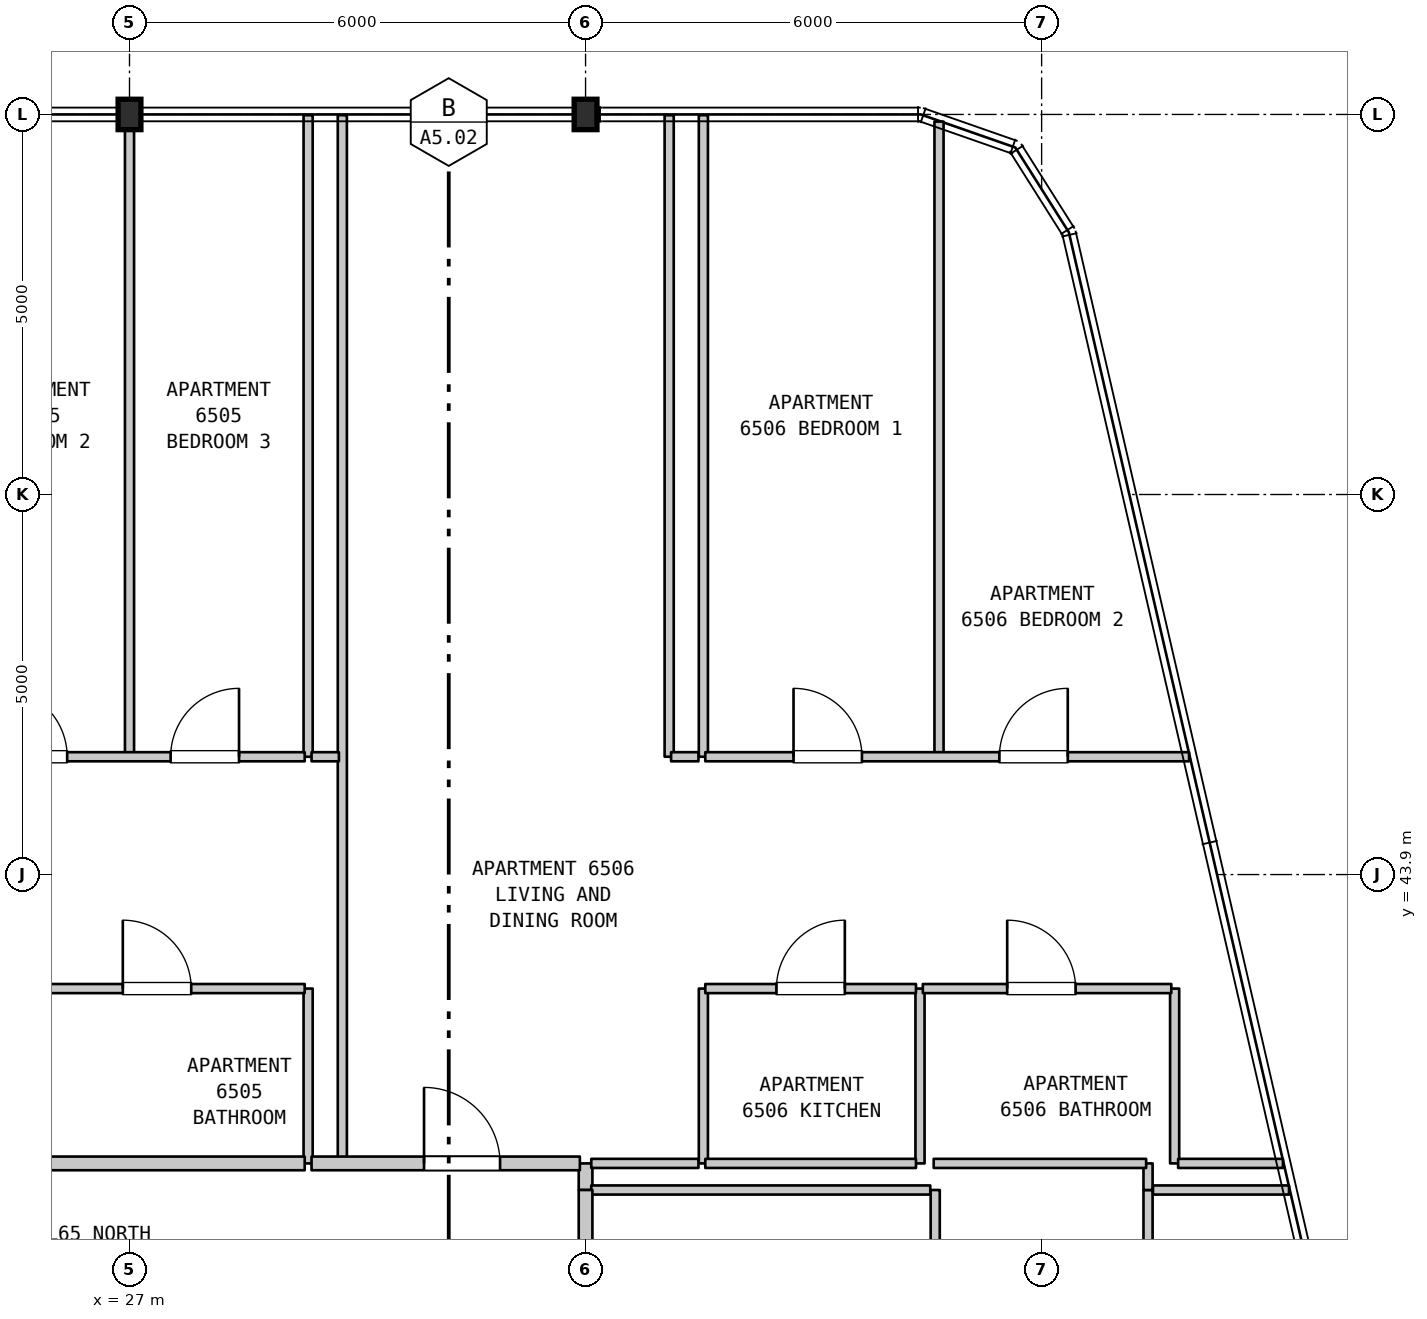
"""IFC4 building model, lengths in metres.
Left out: names, types, materials, properties, quantities, classifications, styles, units other than length and angle.
Written with IfcOpenShell. Run it as: python <this file> out.ifc"""

import sys

from ifc_helpers import new_model, si_unit, direction, frame, frame_2d, origin, origin_2d, place, context, subcontext, project, spatial, rectangle, i_section, extrude, element, fill, save


model = new_model("IFC4")
c1 = context("Model", 3, precision=1e-05, world=origin(), true_north=direction((0.0, 1.0)))
c2 = subcontext(c1, "Body", "Model", "MODEL_VIEW")
j1 = project(units=[si_unit("LENGTHUNIT", "METRE"), si_unit("PLANEANGLEUNIT", "RADIAN")], contexts=[c1])
p1 = place(None, origin())
s1 = spatial("IfcSite", under=j1, at=p1, CompositionType="ELEMENT")
p2 = place(p1, origin())
s2 = spatial("IfcBuilding", under=s1, at=p2, CompositionType="ELEMENT")
p3 = place(p2, frame((0.0, 0.0, 262.1)))
s3 = spatial("IfcBuildingStorey", under=s2, at=p3, CompositionType="ELEMENT", Elevation=262.1)
for number, where, z_axis, x_axis in (
    (1, (27.0, 53.9, 0.0), (0.0, 0.0, 1.0), (1.0, 0.0, 0.0)),
    (2, (33.0, 53.9, 0.0), (0.0, 0.0, 1.0), (1.0, 0.0, 0.0)),
):
    element("IfcColumn", number, at=place(p3, frame(where, z_axis=z_axis, x_axis=x_axis)), inside=s3, PredefinedType="COLUMN", context=c2, shape_type="SweptSolid", body=[
        extrude(i_section(OverallWidth=0.3, OverallDepth=0.4, WebThickness=0.013, FlangeThickness=0.024, FilletRadius=0.027, at=origin_2d()), origin(), (0.0, 0.0, 1.0), 3.7),
    ])
p4 = place(p3, frame((27.0, 45.45, 0.0), z_axis=(0.0, 0.0, 1.0), x_axis=(0.0, 1.0, 0.0)))
e3 = element("IfcWall", 3, at=p4, inside=s3, PredefinedType="PARTITIONING", context=c2, shape_type="SweptSolid", body=[
    extrude(rectangle(XDim=8.44, YDim=0.12, at=frame_2d((4.22, 0.0))), origin(), (0.0, 0.0, 1.0), 3.15),
])
p5 = place(p3, frame((29.35, 40.1, 0.0), z_axis=(0.0, 0.0, 1.0), x_axis=(0.0, 1.0, 0.0)))
e4 = element("IfcWall", 4, at=p5, inside=s3, PredefinedType="PARTITIONING", context=c2, shape_type="SweptSolid", body=[
    extrude(rectangle(XDim=2.3, YDim=0.12, at=frame_2d((1.15, 0.0))), origin(), (0.0, 0.0, 1.0), 3.39),
])
p6 = place(p3, frame((29.35, 45.45, 0.0), z_axis=(0.0, 0.0, 1.0), x_axis=(0.0, 1.0, 0.0)))
e5 = element("IfcWall", 5, at=p6, inside=s3, PredefinedType="PARTITIONING", context=c2, shape_type="SweptSolid", body=[
    extrude(rectangle(XDim=8.44, YDim=0.12, at=frame_2d((4.22, 0.0))), origin(), (0.0, 0.0, 1.0), 3.39),
])
p7 = place(p3, frame((29.8, 40.1, 0.0), z_axis=(0.0, 0.0, 1.0), x_axis=(0.0, 1.0, 0.0)))
e6 = element("IfcWall", 6, at=p7, inside=s3, PredefinedType="PARTITIONING", context=c2, shape_type="SweptSolid", body=[
    extrude(rectangle(XDim=13.79, YDim=0.12, at=frame_2d((6.895, 0.0))), origin(), (0.0, 0.0, 1.0), 3.39),
])
p8 = place(p3, frame((33.0, 39.75, 0.0), z_axis=(0.0, 0.0, 1.0), x_axis=(0.0, 1.0, 0.0)))
e7 = element("IfcWall", 7, at=p8, inside=s3, PredefinedType="STANDARD", context=c2, shape_type="SweptSolid", body=[
    extrude(rectangle(XDim=0.35, YDim=0.18, at=frame_2d((0.175, 0.0))), origin(), (0.0, 0.0, 1.0), 3.39),
])
p9 = place(p3, frame((34.1, 45.45, 0.0), z_axis=(0.0, 0.0, 1.0), x_axis=(0.0, 1.0, 0.0)))
e8 = element("IfcWall", 8, at=p9, inside=s3, PredefinedType="PARTITIONING", context=c2, shape_type="SweptSolid", body=[
    extrude(rectangle(XDim=8.44, YDim=0.12, at=frame_2d((4.22, 0.0))), origin(), (0.0, 0.0, 1.0), 3.39),
])
p10 = place(p3, frame((34.55, 40.1, 0.0), z_axis=(0.0, 0.0, 1.0), x_axis=(0.0, 1.0, 0.0)))
e9 = element("IfcWall", 9, at=p10, inside=s3, PredefinedType="PARTITIONING", context=c2, shape_type="SweptSolid", body=[
    extrude(rectangle(XDim=2.3, YDim=0.12, at=frame_2d((1.15, 0.0))), origin(), (0.0, 0.0, 1.0), 3.39),
])
p11 = place(p3, frame((34.55, 45.45, 0.0), z_axis=(0.0, 0.0, 1.0), x_axis=(0.0, 1.0, 0.0)))
e10 = element("IfcWall", 10, at=p11, inside=s3, PredefinedType="PARTITIONING", context=c2, shape_type="SweptSolid", body=[
    extrude(rectangle(XDim=8.44, YDim=0.12, at=frame_2d((4.22, 0.0))), origin(), (0.0, 0.0, 1.0), 3.39),
])
p12 = place(p3, frame((37.4, 40.1, 0.0), z_axis=(0.0, 0.0, 1.0), x_axis=(0.0, 1.0, 0.0)))
e11 = element("IfcWall", 11, at=p12, inside=s3, PredefinedType="PARTITIONING", context=c2, shape_type="SweptSolid", body=[
    extrude(rectangle(XDim=2.3, YDim=0.12, at=frame_2d((1.15, 0.0))), origin(), (0.0, 0.0, 1.0), 3.39),
])
p13 = place(p3, frame((37.6, 36.095, 0.0), z_axis=(0.0, 0.0, 1.0), x_axis=(0.0, 1.0, 0.0)))
e12 = element("IfcWall", 12, at=p13, inside=s3, PredefinedType="PARTITIONING", context=c2, shape_type="SweptSolid", body=[
    extrude(rectangle(XDim=3.655, YDim=0.12, at=frame_2d((1.828, 0.0))), origin(), (0.0, 0.0, 1.0), 3.39),
])
p14 = place(p13, frame((1.377, 0.0, 0.0)))
e13 = element("IfcOpeningElement", 13, at=p14, cuts=e12, PredefinedType="OPENING", context=c2, shape_type="SweptSolid", body=[
    extrude(rectangle(XDim=0.9, YDim=2.15, at=frame_2d((0.45, 1.075))), frame((0.0, 0.07, 0.0), z_axis=(0.0, -1.0, 0.0), x_axis=(1.0, 0.0, 0.0)), (0.0, 0.0, 1.0), 0.14),
])
p15 = place(p3, frame((37.65, 45.45, 0.0), z_axis=(0.0, 0.0, 1.0), x_axis=(0.0, 1.0, 0.0)))
e14 = element("IfcWall", 14, at=p15, inside=s3, PredefinedType="PARTITIONING", context=c2, shape_type="SweptSolid", body=[
    extrude(rectangle(XDim=8.356, YDim=0.12, at=frame_2d((4.178, 0.0))), origin(), (0.0, 0.0, 1.0), 3.39),
])
p16 = place(p3, frame((40.4, 29.0, 0.0), z_axis=(0.0, 0.0, 1.0), x_axis=(0.0, 1.0, 0.0)))
e15 = element("IfcWall", 15, at=p16, inside=s3, PredefinedType="PARTITIONING", context=c2, shape_type="SweptSolid", body=[
    extrude(rectangle(XDim=10.75, YDim=0.12, at=frame_2d((5.375, 0.0))), origin(), (0.0, 0.0, 1.0), 3.39),
])
p17 = place(p16, frame((2.413, 0.0, 0.0)))
e16 = element("IfcOpeningElement", 16, at=p17, cuts=e15, PredefinedType="OPENING", context=c2, shape_type="SweptSolid", body=[
    extrude(rectangle(XDim=0.9, YDim=2.15, at=frame_2d((0.45, 1.075))), frame((0.0, 0.07, 0.0), z_axis=(0.0, -1.0, 0.0), x_axis=(1.0, 0.0, 0.0)), (0.0, 0.0, 1.0), 0.14),
])
p18 = place(p16, frame((7.438, 0.0, 0.0)))
e17 = element("IfcOpeningElement", 17, at=p18, cuts=e15, PredefinedType="OPENING", context=c2, shape_type="SweptSolid", body=[
    extrude(rectangle(XDim=0.9, YDim=2.15, at=frame_2d((0.45, 1.075))), frame((0.0, 0.07, 0.0), z_axis=(0.0, -1.0, 0.0), x_axis=(1.0, 0.0, 0.0)), (0.0, 0.0, 1.0), 0.14),
])
p19 = place(p3, frame((40.4, 39.75, 0.0), z_axis=(0.0, 0.0, 1.0), x_axis=(0.0, 1.0, 0.0)))
e18 = element("IfcWall", 18, at=p19, inside=s3, PredefinedType="PARTITIONING", context=c2, shape_type="SweptSolid", body=[
    extrude(rectangle(XDim=0.35, YDim=0.12, at=frame_2d((0.175, 0.0))), origin(), (0.0, 0.0, 1.0), 3.39),
])
p20 = place(p3, frame((40.75, 40.1, 0.0), z_axis=(0.0, 0.0, 1.0), x_axis=(0.0, 1.0, 0.0)))
e19 = element("IfcWall", 19, at=p20, inside=s3, PredefinedType="PARTITIONING", context=c2, shape_type="SweptSolid", body=[
    extrude(rectangle(XDim=2.3, YDim=0.12, at=frame_2d((1.15, 0.0))), origin(), (0.0, 0.0, 1.0), 3.39),
])
p21 = place(p3, frame((33.075, 39.75, 0.0), z_axis=(0.0, 0.0, 1.0), x_axis=(1.0, 0.0, 0.0)))
e20 = element("IfcWall", 20, at=p21, inside=s3, PredefinedType="PARTITIONING", context=c2, shape_type="SweptSolid", body=[
    extrude(rectangle(XDim=4.46, YDim=0.12, at=frame_2d((2.23, 0.0))), origin(), (0.0, 0.0, 1.0), 3.39),
])
p22 = place(p3, frame((40.465, 39.75, 0.0), z_axis=(0.0, 0.0, 1.0), x_axis=(1.0, 0.0, 0.0)))
e21 = element("IfcWall", 21, at=p22, inside=s3, PredefinedType="PARTITIONING", context=c2, shape_type="SweptSolid", body=[
    extrude(rectangle(XDim=1.79, YDim=0.12, at=frame_2d((0.895, 0.0))), origin(), (0.0, 0.0, 1.0), 3.39),
])
p23 = place(p3, frame((25.561, 40.1, 0.0), z_axis=(0.0, 0.0, 1.0), x_axis=(1.0, 0.0, 0.0)))
e22 = element("IfcWall", 22, at=p23, inside=s3, PredefinedType="STANDARD", context=c2, shape_type="SweptSolid", body=[
    extrude(rectangle(XDim=3.744, YDim=0.18, at=frame_2d((1.872, 0.0))), origin(), (0.0, 0.0, 1.0), 3.39),
])
p24 = place(p3, frame((29.395, 40.1, 0.0), z_axis=(0.0, 0.0, 1.0), x_axis=(1.0, 0.0, 0.0)))
e23 = element("IfcWall", 23, at=p24, inside=s3, PredefinedType="STANDARD", context=c2, shape_type="SweptSolid", body=[
    extrude(rectangle(XDim=3.53, YDim=0.18, at=frame_2d((1.765, 0.0))), origin(), (0.0, 0.0, 1.0), 3.39),
])
p25 = place(p24, frame((1.48, 0.0, 0.0)))
e24 = element("IfcOpeningElement", 24, at=p25, cuts=e23, PredefinedType="OPENING", context=c2, shape_type="SweptSolid", body=[
    extrude(rectangle(XDim=1.0, YDim=2.15, at=frame_2d((0.5, 1.075))), frame((0.0, 0.1, 0.0), z_axis=(0.0, -1.0, 0.0), x_axis=(1.0, 0.0, 0.0)), (0.0, 0.0, 1.0), 0.2),
])
p26 = place(p3, frame((33.075, 40.1, 0.0), z_axis=(0.0, 0.0, 1.0), x_axis=(1.0, 0.0, 0.0)))
e25 = element("IfcWall", 25, at=p26, inside=s3, PredefinedType="PARTITIONING", context=c2, shape_type="SweptSolid", body=[
    extrude(rectangle(XDim=1.41, YDim=0.12, at=frame_2d((0.705, 0.0))), origin(), (0.0, 0.0, 1.0), 3.39),
])
p27 = place(p3, frame((34.575, 40.1, 0.0), z_axis=(0.0, 0.0, 1.0), x_axis=(1.0, 0.0, 0.0)))
e26 = element("IfcWall", 26, at=p27, inside=s3, PredefinedType="PARTITIONING", context=c2, shape_type="SweptSolid", body=[
    extrude(rectangle(XDim=2.772, YDim=0.12, at=frame_2d((1.386, 0.0))), origin(), (0.0, 0.0, 1.0), 3.39),
])
p28 = place(p3, frame((37.58, 40.1, 0.0), z_axis=(0.0, 0.0, 1.0), x_axis=(1.0, 0.0, 0.0)))
e27 = element("IfcWall", 27, at=p28, inside=s3, PredefinedType="PARTITIONING", context=c2, shape_type="SweptSolid", body=[
    extrude(rectangle(XDim=2.795, YDim=0.12, at=frame_2d((1.397, 0.0))), origin(), (0.0, 0.0, 1.0), 3.39),
])
p29 = place(p3, frame((40.796, 40.1, 0.0), z_axis=(0.0, 0.0, 1.0), x_axis=(1.0, 0.0, 0.0)))
e28 = element("IfcWall", 28, at=p29, inside=s3, PredefinedType="PARTITIONING", context=c2, shape_type="SweptSolid", body=[
    extrude(rectangle(XDim=1.379, YDim=0.12, at=frame_2d((0.689, 0.0))), origin(), (0.0, 0.0, 1.0), 3.39),
])
p30 = place(p3, frame((25.561, 42.4, 0.0), z_axis=(0.0, 0.0, 1.0), x_axis=(1.0, 0.0, 0.0)))
e29 = element("IfcWall", 29, at=p30, inside=s3, PredefinedType="PARTITIONING", context=c2, shape_type="SweptSolid", body=[
    extrude(rectangle(XDim=3.744, YDim=0.12, at=frame_2d((1.872, 0.0))), origin(), (0.0, 0.0, 1.0), 3.39),
])
p31 = place(p30, frame((1.351, 0.0, 0.0)))
e30 = element("IfcOpeningElement", 30, at=p31, cuts=e29, PredefinedType="OPENING", context=c2, shape_type="SweptSolid", body=[
    extrude(rectangle(XDim=0.9, YDim=2.1, at=frame_2d((0.45, 1.05))), frame((0.0, 0.07, 0.0), z_axis=(0.0, -1.0, 0.0), x_axis=(1.0, 0.0, 0.0)), (0.0, 0.0, 1.0), 0.14),
])
p32 = place(p3, frame((34.575, 42.4, 0.0), z_axis=(0.0, 0.0, 1.0), x_axis=(1.0, 0.0, 0.0)))
e31 = element("IfcWall", 31, at=p32, inside=s3, PredefinedType="PARTITIONING", context=c2, shape_type="SweptSolid", body=[
    extrude(rectangle(XDim=2.772, YDim=0.12, at=frame_2d((1.386, 0.0))), origin(), (0.0, 0.0, 1.0), 3.39),
])
p33 = place(p32, frame((0.936, 0.0, 0.0)))
e32 = element("IfcOpeningElement", 32, at=p33, cuts=e31, PredefinedType="OPENING", context=c2, shape_type="SweptSolid", body=[
    extrude(rectangle(XDim=0.9, YDim=2.15, at=frame_2d((0.45, 1.075))), frame((0.0, 0.07, 0.0), z_axis=(0.0, -1.0, 0.0), x_axis=(1.0, 0.0, 0.0)), (0.0, 0.0, 1.0), 0.14),
])
p34 = place(p3, frame((37.437, 42.4, 0.0), z_axis=(0.0, 0.0, 1.0), x_axis=(1.0, 0.0, 0.0)))
e33 = element("IfcWall", 33, at=p34, inside=s3, PredefinedType="PARTITIONING", context=c2, shape_type="SweptSolid", body=[
    extrude(rectangle(XDim=3.269, YDim=0.12, at=frame_2d((1.635, 0.0))), origin(), (0.0, 0.0, 1.0), 3.39),
])
p35 = place(p34, frame((1.11, 0.0, 0.0)))
e34 = element("IfcOpeningElement", 34, at=p35, cuts=e33, PredefinedType="OPENING", context=c2, shape_type="SweptSolid", body=[
    extrude(rectangle(XDim=0.9, YDim=2.1, at=frame_2d((0.45, 1.05))), frame((0.0, 0.07, 0.0), z_axis=(0.0, -1.0, 0.0), x_axis=(1.0, 0.0, 0.0)), (0.0, 0.0, 1.0), 0.14),
])
p36 = place(p3, frame((22.295, 45.45, 0.0), z_axis=(0.0, 0.0, 1.0), x_axis=(1.0, 0.0, 0.0)))
e35 = element("IfcWall", 35, at=p36, inside=s3, PredefinedType="PARTITIONING", context=c2, shape_type="SweptSolid", body=[
    extrude(rectangle(XDim=7.01, YDim=0.12, at=frame_2d((3.505, 0.0))), origin(), (0.0, 0.0, 1.0), 3.39),
])
p37 = place(p36, frame((0.863, 0.0, 0.0)))
e36 = element("IfcOpeningElement", 36, at=p37, cuts=e35, PredefinedType="OPENING", context=c2, shape_type="SweptSolid", body=[
    extrude(rectangle(XDim=0.9, YDim=2.15, at=frame_2d((0.45, 1.075))), frame((0.0, 0.07, 0.0), z_axis=(0.0, -1.0, 0.0), x_axis=(1.0, 0.0, 0.0)), (0.0, 0.0, 1.0), 0.14),
])
p38 = place(p36, frame((2.985, 0.0, 0.0)))
e37 = element("IfcOpeningElement", 37, at=p38, cuts=e35, PredefinedType="OPENING", context=c2, shape_type="SweptSolid", body=[
    extrude(rectangle(XDim=0.9, YDim=2.15, at=frame_2d((0.45, 1.075))), frame((0.0, 0.07, 0.0), z_axis=(0.0, -1.0, 0.0), x_axis=(1.0, 0.0, 0.0)), (0.0, 0.0, 1.0), 0.14),
])
p39 = place(p36, frame((5.246, 0.0, 0.0)))
e38 = element("IfcOpeningElement", 38, at=p39, cuts=e35, PredefinedType="OPENING", context=c2, shape_type="SweptSolid", body=[
    extrude(rectangle(XDim=0.9, YDim=2.15, at=frame_2d((0.45, 1.075))), frame((0.0, 0.07, 0.0), z_axis=(0.0, -1.0, 0.0), x_axis=(1.0, 0.0, 0.0)), (0.0, 0.0, 1.0), 0.14),
])
p40 = place(p3, frame((29.395, 45.45, 0.0), z_axis=(0.0, 0.0, 1.0), x_axis=(1.0, 0.0, 0.0)))
e39 = element("IfcWall", 39, at=p40, inside=s3, PredefinedType="PARTITIONING", context=c2, shape_type="SweptSolid", body=[
    extrude(rectangle(XDim=0.36, YDim=0.12, at=frame_2d((0.18, 0.0))), origin(), (0.0, 0.0, 1.0), 3.39),
])
p41 = place(p3, frame((34.125, 45.45, 0.0), z_axis=(0.0, 0.0, 1.0), x_axis=(1.0, 0.0, 0.0)))
e40 = element("IfcWall", 40, at=p41, inside=s3, PredefinedType="PARTITIONING", context=c2, shape_type="SweptSolid", body=[
    extrude(rectangle(XDim=0.36, YDim=0.12, at=frame_2d((0.18, 0.0))), origin(), (0.0, 0.0, 1.0), 3.39),
])
p42 = place(p3, frame((34.575, 45.45, 0.0), z_axis=(0.0, 0.0, 1.0), x_axis=(1.0, 0.0, 0.0)))
e41 = element("IfcWall", 41, at=p42, inside=s3, PredefinedType="PARTITIONING", context=c2, shape_type="SweptSolid", body=[
    extrude(rectangle(XDim=6.365, YDim=0.12, at=frame_2d((3.183, 0.0))), origin(), (0.0, 0.0, 1.0), 3.39),
])
p43 = place(p42, frame((1.161, 0.0, 0.0)))
e42 = element("IfcOpeningElement", 42, at=p43, cuts=e41, PredefinedType="OPENING", context=c2, shape_type="SweptSolid", body=[
    extrude(rectangle(XDim=0.9, YDim=2.15, at=frame_2d((0.45, 1.075))), frame((0.0, 0.07, 0.0), z_axis=(0.0, -1.0, 0.0), x_axis=(1.0, 0.0, 0.0)), (0.0, 0.0, 1.0), 0.14),
])
p44 = place(p42, frame((3.869, 0.0, 0.0)))
e43 = element("IfcOpeningElement", 43, at=p44, cuts=e41, PredefinedType="OPENING", context=c2, shape_type="SweptSolid", body=[
    extrude(rectangle(XDim=0.9, YDim=2.15, at=frame_2d((0.45, 1.075))), frame((0.0, 0.07, 0.0), z_axis=(0.0, -1.0, 0.0), x_axis=(1.0, 0.0, 0.0)), (0.0, 0.0, 1.0), 0.14),
])
p45 = place(p3, frame((33.0, 37.9, 0.0), z_axis=(0.0, 0.0, 1.0), x_axis=(0.0, 1.0, 0.0)))
e44 = element("IfcWall", 44, at=p45, inside=s3, PredefinedType="STANDARD", context=c2, shape_type="SweptSolid", body=[
    extrude(rectangle(XDim=1.85, YDim=0.18, at=frame_2d((0.925, 0.0))), origin(), (0.0, 0.0, 1.0), 2.79),
])
p46 = place(p25, origin())
e45 = element("IfcDoor", 45, at=p46, inside=s3, OperationType="SINGLE_SWING_LEFT", PredefinedType="DOOR", context=c2, shape_type="SweptSolid", body=[
    extrude(rectangle(XDim=1.0, YDim=2.15, at=frame_2d((0.5, 1.075))), frame((0.0, 0.025, 0.0), z_axis=(0.0, -1.0, 0.0), x_axis=(1.0, 0.0, 0.0)), (0.0, 0.0, 1.0), 0.05),
])
fill(e24, e45)
p47 = place(p31, origin())
e46 = element("IfcDoor", 46, at=p47, inside=s3, OperationType="SINGLE_SWING_LEFT", PredefinedType="DOOR", context=c2, shape_type="SweptSolid", body=[
    extrude(rectangle(XDim=0.9, YDim=2.1, at=frame_2d((0.45, 1.05))), frame((0.0, 0.025, 0.0), z_axis=(0.0, -1.0, 0.0), x_axis=(1.0, 0.0, 0.0)), (0.0, 0.0, 1.0), 0.05),
])
fill(e30, e46)
p48 = place(p33, origin())
e47 = element("IfcDoor", 47, at=p48, inside=s3, OperationType="SINGLE_SWING_RIGHT", PredefinedType="DOOR", context=c2, shape_type="SweptSolid", body=[
    extrude(rectangle(XDim=0.9, YDim=2.15, at=frame_2d((0.45, 1.075))), frame((0.0, 0.025, 0.0), z_axis=(0.0, -1.0, 0.0), x_axis=(1.0, 0.0, 0.0)), (0.0, 0.0, 1.0), 0.05),
])
fill(e32, e47)
p49 = place(p35, origin())
e48 = element("IfcDoor", 48, at=p49, inside=s3, OperationType="SINGLE_SWING_LEFT", PredefinedType="DOOR", context=c2, shape_type="SweptSolid", body=[
    extrude(rectangle(XDim=0.9, YDim=2.1, at=frame_2d((0.45, 1.05))), frame((0.0, 0.025, 0.0), z_axis=(0.0, -1.0, 0.0), x_axis=(1.0, 0.0, 0.0)), (0.0, 0.0, 1.0), 0.05),
])
fill(e34, e48)
p50 = place(p38, origin())
e49 = element("IfcDoor", 49, at=p50, inside=s3, OperationType="SINGLE_SWING_LEFT", PredefinedType="DOOR", context=c2, shape_type="SweptSolid", body=[
    extrude(rectangle(XDim=0.9, YDim=2.15, at=frame_2d((0.45, 1.075))), frame((0.0, 0.025, 0.0), z_axis=(0.0, -1.0, 0.0), x_axis=(1.0, 0.0, 0.0)), (0.0, 0.0, 1.0), 0.05),
])
fill(e37, e49)
p51 = place(p39, origin())
e50 = element("IfcDoor", 50, at=p51, inside=s3, OperationType="SINGLE_SWING_RIGHT", PredefinedType="DOOR", context=c2, shape_type="SweptSolid", body=[
    extrude(rectangle(XDim=0.9, YDim=2.15, at=frame_2d((0.45, 1.075))), frame((0.0, 0.025, 0.0), z_axis=(0.0, -1.0, 0.0), x_axis=(1.0, 0.0, 0.0)), (0.0, 0.0, 1.0), 0.05),
])
fill(e38, e50)
p52 = place(p43, origin())
e51 = element("IfcDoor", 51, at=p52, inside=s3, OperationType="SINGLE_SWING_LEFT", PredefinedType="DOOR", context=c2, shape_type="SweptSolid", body=[
    extrude(rectangle(XDim=0.9, YDim=2.15, at=frame_2d((0.45, 1.075))), frame((0.0, 0.025, 0.0), z_axis=(0.0, -1.0, 0.0), x_axis=(1.0, 0.0, 0.0)), (0.0, 0.0, 1.0), 0.05),
])
fill(e42, e51)
p53 = place(p44, origin())
e52 = element("IfcDoor", 52, at=p53, inside=s3, OperationType="SINGLE_SWING_RIGHT", PredefinedType="DOOR", context=c2, shape_type="SweptSolid", body=[
    extrude(rectangle(XDim=0.9, YDim=2.15, at=frame_2d((0.45, 1.075))), frame((0.0, 0.025, 0.0), z_axis=(0.0, -1.0, 0.0), x_axis=(1.0, 0.0, 0.0)), (0.0, 0.0, 1.0), 0.05),
])
fill(e43, e52)
save(model, sys.argv[1])
